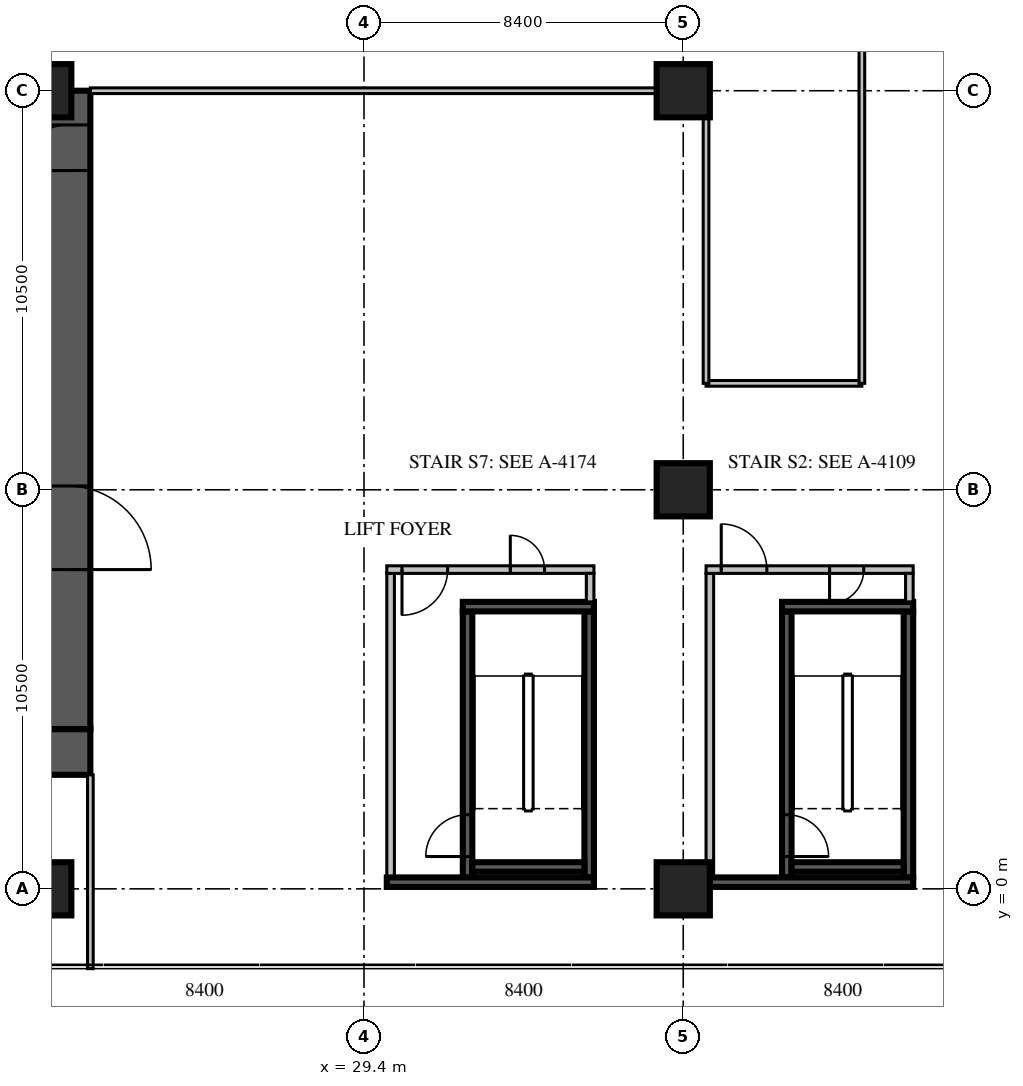
"""IFC4 building model, lengths in metres.
Left out: names, types, materials, properties, quantities, classifications, styles, units other than length and angle.
Written with IfcOpenShell. Run it as: python <this file> out.ifc"""

import sys

from ifc_helpers import new_model, si_unit, direction, frame, frame_2d, origin, origin_2d, place, context, subcontext, project, spatial, rectangle, extrude, source, transform, mapped, element, fill, save


model = new_model("IFC4")
c1 = context("Model", 3, precision=1e-05, world=origin(), true_north=direction((0.0, 1.0)))
c2 = subcontext(c1, "Body", "Model", "MODEL_VIEW")
j1 = project(units=[si_unit("LENGTHUNIT", "METRE"), si_unit("PLANEANGLEUNIT", "RADIAN")], contexts=[c1])
p1 = place(None, origin())
s1 = spatial("IfcSite", under=j1, at=p1, CompositionType="ELEMENT")
p2 = place(p1, origin())
s2 = spatial("IfcBuilding", under=s1, at=p2, CompositionType="ELEMENT")
p3 = place(p2, frame((0.0, 0.0, 23.7)))
s3 = spatial("IfcBuildingStorey", under=s2, at=p3, CompositionType="ELEMENT", Elevation=23.7)
m1 = source(origin(), c2, "Body", "SweptSolid", [
    extrude(rectangle(XDim=1.4, YDim=1.4, at=origin_2d()), origin(), (0.0, 0.0, 1.0), 5.4),
])
for number, where, z_axis, x_axis in (
    (1, (21.0, 0.0, 0.0), (0.0, 0.0, 1.0), (1.0, 0.0, 0.0)),
    (2, (21.0, 21.0, 0.0), (0.0, 0.0, 1.0), (1.0, 0.0, 0.0)),
    (3, (37.8, 0.0, 0.0), (0.0, 0.0, 1.0), (1.0, 0.0, 0.0)),
    (4, (37.8, 10.5, 0.0), (0.0, 0.0, 1.0), (1.0, 0.0, 0.0)),
    (5, (37.8, 21.0, 0.0), (0.0, 0.0, 1.0), (1.0, 0.0, 0.0)),
):
    element("IfcColumn", number, at=place(p3, frame(where, z_axis=z_axis, x_axis=x_axis)), inside=s3, PredefinedType="COLUMN", context=c2, shape_type="MappedRepresentation", body=[
        mapped(m1, transform((0.0, 0.0, 0.0), scale=1.0)),
    ])
m2 = source(origin(), c2, "Body", "SweptSolid", [
    extrude(rectangle(XDim=16.8, YDim=1.2, at=frame_2d((8.4, 0.0))), origin(), (0.0, 0.0, 1.0), 5.4),
])
p4 = place(p3, frame((21.6, 4.2, 0.0), z_axis=(0.0, 0.0, 1.0), x_axis=(0.0, 1.0, 0.0)))
e6 = element("IfcWall", 6, at=p4, inside=s3, PredefinedType="SHEAR", context=c2, shape_type="MappedRepresentation", body=[
    mapped(m2, transform((0.0, 0.0, 0.0), scale=1.0)),
])
m3 = source(origin(), c2, "Body", "SweptSolid", [
    extrude(rectangle(XDim=2.2, YDim=2.1, at=frame_2d((1.1, 1.05))), frame((0.0, 0.61, 0.0), z_axis=(0.0, -1.0, 0.0), x_axis=(1.0, 0.0, 0.0)), (0.0, 0.0, 1.0), 1.22),
])
p5 = place(p4, frame((4.2, 0.0, 0.0)))
e7 = element("IfcOpeningElement", 7, at=p5, cuts=e6, PredefinedType="OPENING", context=c2, shape_type="MappedRepresentation", body=[
    mapped(m3, transform((0.0, 0.0, 0.0), scale=1.0)),
])
m4 = source(origin(), c2, "Body", "SweptSolid", [
    extrude(rectangle(XDim=1.2, YDim=2.1, at=frame_2d((0.6, 1.05))), frame((0.0, 0.61, 0.0), z_axis=(0.0, -1.0, 0.0), x_axis=(1.0, 0.0, 0.0)), (0.0, 0.0, 1.0), 1.22),
])
p6 = place(p4, frame((14.7, 0.0, 0.0)))
e8 = element("IfcOpeningElement", 8, at=p6, cuts=e6, PredefinedType="OPENING", context=c2, shape_type="MappedRepresentation", body=[
    mapped(m4, transform((0.0, 0.0, 0.0), scale=1.0)),
])
m5 = source(origin(), c2, "Body", "SweptSolid", [
    extrude(rectangle(XDim=18.0, YDim=1.2, at=frame_2d((9.0, 0.0))), origin(), (0.0, 0.0, 1.0), 5.4),
])
p7 = place(p3, frame((4.2, 3.6, 0.0), z_axis=(0.0, 0.0, 1.0), x_axis=(1.0, 0.0, 0.0)))
e9 = element("IfcWall", 9, at=p7, inside=s3, PredefinedType="SHEAR", context=c2, shape_type="MappedRepresentation", body=[
    mapped(m5, transform((0.0, 0.0, 0.0), scale=1.0)),
])
m6 = source(origin(), c2, "Body", "SweptSolid", [
    extrude(rectangle(XDim=7.0, YDim=0.25, at=frame_2d((3.5, 0.0))), origin(), (0.0, 0.0, 1.0), 4.8),
])
p8 = place(p3, frame((40.525, 0.3, 0.0), z_axis=(0.0, 0.0, 1.0), x_axis=(0.0, 1.0, 0.0)))
e10 = element("IfcWall", 10, at=p8, inside=s3, PredefinedType="SOLIDWALL", context=c2, shape_type="MappedRepresentation", body=[
    mapped(m6, transform((0.0, 0.0, 0.0), scale=1.0)),
])
m7 = source(origin(), c2, "Body", "SweptSolid", [
    extrude(rectangle(XDim=1.1, YDim=2.1, at=frame_2d((0.55, 1.05))), frame((0.0, 0.135, 0.0), z_axis=(0.0, -1.0, 0.0), x_axis=(1.0, 0.0, 0.0)), (0.0, 0.0, 1.0), 0.27),
])
p9 = place(p8, frame((0.55, 0.0, 0.0)))
e11 = element("IfcOpeningElement", 11, at=p9, cuts=e10, PredefinedType="OPENING", context=c2, shape_type="MappedRepresentation", body=[
    mapped(m7, transform((0.0, 0.0, 0.0), scale=1.0)),
])
p10 = place(p3, frame((43.725, 0.3, 0.0), z_axis=(0.0, 0.0, 1.0), x_axis=(0.0, 1.0, 0.0)))
e12 = element("IfcWall", 12, at=p10, inside=s3, PredefinedType="SOLIDWALL", context=c2, shape_type="MappedRepresentation", body=[
    mapped(m6, transform((0.0, 0.0, 0.0), scale=1.0)),
])
m8 = source(origin(), c2, "Body", "SweptSolid", [
    extrude(rectangle(XDim=3.45, YDim=0.25, at=frame_2d((1.725, 0.0))), origin(), (0.0, 0.0, 1.0), 4.8),
])
p11 = place(p3, frame((40.4, 7.425, 0.0), z_axis=(0.0, 0.0, 1.0), x_axis=(1.0, 0.0, 0.0)))
e13 = element("IfcWall", 13, at=p11, inside=s3, PredefinedType="SOLIDWALL", context=c2, shape_type="MappedRepresentation", body=[
    mapped(m8, transform((0.0, 0.0, 0.0), scale=1.0)),
])
m9 = source(origin(), c2, "Body", "SweptSolid", [
    extrude(rectangle(XDim=2.95, YDim=0.25, at=frame_2d((1.475, 0.0))), origin(), (0.0, 0.0, 1.0), 4.8),
])
p12 = place(p3, frame((40.65, 0.575, 0.0), z_axis=(0.0, 0.0, 1.0), x_axis=(1.0, 0.0, 0.0)))
e14 = element("IfcWall", 14, at=p12, inside=s3, PredefinedType="SOLIDWALL", context=c2, shape_type="MappedRepresentation", body=[
    mapped(m9, transform((0.0, 0.0, 0.0), scale=1.0)),
])
m10 = source(origin(), c2, "Body", "SweptSolid", [
    extrude(rectangle(XDim=8.0, YDim=0.2, at=frame_2d((4.0, 0.0))), origin(), (0.0, 0.0, 1.0), 4.8),
])
p13 = place(p3, frame((38.5, 0.3, 0.0), z_axis=(0.0, 0.0, 1.0), x_axis=(0.0, 1.0, 0.0)))
e15 = element("IfcWall", 15, at=p13, inside=s3, PredefinedType="PARTITIONING", context=c2, shape_type="MappedRepresentation", body=[
    mapped(m10, transform((0.0, 0.0, 0.0), scale=1.0)),
])
m11 = source(origin(), c2, "Body", "SweptSolid", [
    extrude(rectangle(XDim=5.45, YDim=0.2, at=frame_2d((2.725, 0.0))), origin(), (0.0, 0.0, 1.0), 4.8),
])
p14 = place(p3, frame((38.4, 8.4, 0.0), z_axis=(0.0, 0.0, 1.0), x_axis=(1.0, 0.0, 0.0)))
e16 = element("IfcWall", 16, at=p14, inside=s3, PredefinedType="PARTITIONING", context=c2, shape_type="MappedRepresentation", body=[
    mapped(m11, transform((0.0, 0.0, 0.0), scale=1.0)),
])
m12 = source(origin(), c2, "Body", "SweptSolid", [
    extrude(rectangle(XDim=1.2, YDim=2.1, at=frame_2d((0.6, 1.05))), frame((0.0, 0.11, 0.0), z_axis=(0.0, -1.0, 0.0), x_axis=(1.0, 0.0, 0.0)), (0.0, 0.0, 1.0), 0.22),
])
p15 = place(p14, frame((0.4, 0.0, 0.0)))
e17 = element("IfcOpeningElement", 17, at=p15, cuts=e16, PredefinedType="OPENING", context=c2, shape_type="MappedRepresentation", body=[
    mapped(m12, transform((0.0, 0.0, 0.0), scale=1.0)),
])
m13 = source(origin(), c2, "Body", "SweptSolid", [
    extrude(rectangle(XDim=0.9, YDim=2.1, at=frame_2d((0.45, 1.05))), frame((0.0, 0.11, 0.0), z_axis=(0.0, -1.0, 0.0), x_axis=(1.0, 0.0, 0.0)), (0.0, 0.0, 1.0), 0.22),
])
p16 = place(p14, frame((3.25, 0.0, 0.0)))
e18 = element("IfcOpeningElement", 18, at=p16, cuts=e16, PredefinedType="OPENING", context=c2, shape_type="MappedRepresentation", body=[
    mapped(m13, transform((0.0, 0.0, 0.0), scale=1.0)),
])
m14 = source(origin(), c2, "Body", "SweptSolid", [
    extrude(rectangle(XDim=0.75, YDim=0.2, at=frame_2d((0.375, 0.0))), origin(), (0.0, 0.0, 1.0), 4.8),
])
p17 = place(p3, frame((43.75, 7.55, 0.0), z_axis=(0.0, 0.0, 1.0), x_axis=(0.0, 1.0, 0.0)))
e19 = element("IfcWall", 19, at=p17, inside=s3, PredefinedType="PARTITIONING", context=c2, shape_type="MappedRepresentation", body=[
    mapped(m14, transform((0.0, 0.0, 0.0), scale=1.0)),
])
m15 = source(origin(), c2, "Body", "SweptSolid", [
    extrude(rectangle(XDim=5.45, YDim=0.25, at=frame_2d((2.725, 0.0))), origin(), (0.0, 0.0, 1.0), 4.8),
])
p18 = place(p3, frame((38.4, 0.175, 0.0), z_axis=(0.0, 0.0, 1.0), x_axis=(1.0, 0.0, 0.0)))
e20 = element("IfcWall", 20, at=p18, inside=s3, PredefinedType="SOLIDWALL", context=c2, shape_type="MappedRepresentation", body=[
    mapped(m15, transform((0.0, 0.0, 0.0), scale=1.0)),
])
p19 = place(p3, frame((32.125, 0.3, 0.0), z_axis=(0.0, 0.0, 1.0), x_axis=(0.0, 1.0, 0.0)))
e21 = element("IfcWall", 21, at=p19, inside=s3, PredefinedType="SOLIDWALL", context=c2, shape_type="MappedRepresentation", body=[
    mapped(m6, transform((0.0, 0.0, 0.0), scale=1.0)),
])
p20 = place(p19, frame((0.55, 0.0, 0.0)))
e22 = element("IfcOpeningElement", 22, at=p20, cuts=e21, PredefinedType="OPENING", context=c2, shape_type="MappedRepresentation", body=[
    mapped(m7, transform((0.0, 0.0, 0.0), scale=1.0)),
])
p21 = place(p3, frame((35.325, 0.3, 0.0), z_axis=(0.0, 0.0, 1.0), x_axis=(0.0, 1.0, 0.0)))
e23 = element("IfcWall", 23, at=p21, inside=s3, PredefinedType="SOLIDWALL", context=c2, shape_type="MappedRepresentation", body=[
    mapped(m6, transform((0.0, 0.0, 0.0), scale=1.0)),
])
p22 = place(p3, frame((32.0, 7.425, 0.0), z_axis=(0.0, 0.0, 1.0), x_axis=(1.0, 0.0, 0.0)))
e24 = element("IfcWall", 24, at=p22, inside=s3, PredefinedType="SOLIDWALL", context=c2, shape_type="MappedRepresentation", body=[
    mapped(m8, transform((0.0, 0.0, 0.0), scale=1.0)),
])
p23 = place(p3, frame((32.25, 0.575, 0.0), z_axis=(0.0, 0.0, 1.0), x_axis=(1.0, 0.0, 0.0)))
e25 = element("IfcWall", 25, at=p23, inside=s3, PredefinedType="SOLIDWALL", context=c2, shape_type="MappedRepresentation", body=[
    mapped(m9, transform((0.0, 0.0, 0.0), scale=1.0)),
])
p24 = place(p3, frame((30.1, 0.3, 0.0), z_axis=(0.0, 0.0, 1.0), x_axis=(0.0, 1.0, 0.0)))
e26 = element("IfcWall", 26, at=p24, inside=s3, PredefinedType="PARTITIONING", context=c2, shape_type="MappedRepresentation", body=[
    mapped(m10, transform((0.0, 0.0, 0.0), scale=1.0)),
])
p25 = place(p3, frame((30.0, 8.4, 0.0), z_axis=(0.0, 0.0, 1.0), x_axis=(1.0, 0.0, 0.0)))
e27 = element("IfcWall", 27, at=p25, inside=s3, PredefinedType="PARTITIONING", context=c2, shape_type="MappedRepresentation", body=[
    mapped(m11, transform((0.0, 0.0, 0.0), scale=1.0)),
])
p26 = place(p25, frame((0.4, 0.0, 0.0)))
e28 = element("IfcOpeningElement", 28, at=p26, cuts=e27, PredefinedType="OPENING", context=c2, shape_type="MappedRepresentation", body=[
    mapped(m12, transform((0.0, 0.0, 0.0), scale=1.0)),
])
p27 = place(p25, frame((3.25, 0.0, 0.0)))
e29 = element("IfcOpeningElement", 29, at=p27, cuts=e27, PredefinedType="OPENING", context=c2, shape_type="MappedRepresentation", body=[
    mapped(m13, transform((0.0, 0.0, 0.0), scale=1.0)),
])
p28 = place(p3, frame((35.35, 7.55, 0.0), z_axis=(0.0, 0.0, 1.0), x_axis=(0.0, 1.0, 0.0)))
e30 = element("IfcWall", 30, at=p28, inside=s3, PredefinedType="PARTITIONING", context=c2, shape_type="MappedRepresentation", body=[
    mapped(m14, transform((0.0, 0.0, 0.0), scale=1.0)),
])
p29 = place(p3, frame((30.0, 0.175, 0.0), z_axis=(0.0, 0.0, 1.0), x_axis=(1.0, 0.0, 0.0)))
e31 = element("IfcWall", 31, at=p29, inside=s3, PredefinedType="SOLIDWALL", context=c2, shape_type="MappedRepresentation", body=[
    mapped(m15, transform((0.0, 0.0, 0.0), scale=1.0)),
])
m16 = source(origin(), c2, "Body", "SweptSolid", [
    extrude(rectangle(XDim=4.1, YDim=0.15, at=frame_2d((2.05, 0.0))), origin(), (0.0, 0.0, 1.0), 4.8),
])
p30 = place(p3, frame((38.4, 13.3, 0.0), z_axis=(0.0, 0.0, 1.0), x_axis=(1.0, 0.0, 0.0)))
e32 = element("IfcWall", 32, at=p30, inside=s3, PredefinedType="PARTITIONING", context=c2, shape_type="MappedRepresentation", body=[
    mapped(m16, transform((0.0, 0.0, 0.0), scale=1.0)),
])
m17 = source(origin(), c2, "Body", "SweptSolid", [
    extrude(rectangle(XDim=16.2, YDim=0.15, at=frame_2d((8.1, 0.0))), origin(), (0.0, 0.0, 1.0), 4.8),
])
p31 = place(p3, frame((22.2, 21.0, 0.0), z_axis=(0.0, 0.0, 1.0), x_axis=(1.0, 0.0, 0.0)))
e33 = element("IfcWall", 33, at=p31, inside=s3, PredefinedType="PARTITIONING", context=c2, shape_type="MappedRepresentation", body=[
    mapped(m17, transform((0.0, 0.0, 0.0), scale=1.0)),
])
m18 = source(origin(), c2, "Body", "SweptSolid", [
    extrude(rectangle(XDim=5.1, YDim=0.15, at=frame_2d((2.55, 0.0))), origin(), (0.0, 0.0, 1.0), 4.8),
])
p32 = place(p3, frame((22.2, -2.1, 0.0), z_axis=(0.0, 0.0, 1.0), x_axis=(0.0, 1.0, 0.0)))
e34 = element("IfcWall", 34, at=p32, inside=s3, PredefinedType="PARTITIONING", context=c2, shape_type="MappedRepresentation", body=[
    mapped(m18, transform((0.0, 0.0, 0.0), scale=1.0)),
])
m19 = source(origin(), c2, "Body", "SweptSolid", [
    extrude(rectangle(XDim=7.7, YDim=0.15, at=frame_2d((3.85, 0.0))), origin(), (0.0, 0.0, 1.0), 4.8),
])
p33 = place(p3, frame((38.4, 13.3, 0.0), z_axis=(0.0, 0.0, 1.0), x_axis=(0.0, 1.0, 0.0)))
e35 = element("IfcWall", 35, at=p33, inside=s3, PredefinedType="PARTITIONING", context=c2, shape_type="MappedRepresentation", body=[
    mapped(m19, transform((0.0, 0.0, 0.0), scale=1.0)),
])
m20 = source(origin(), c2, "Body", "SweptSolid", [
    extrude(rectangle(XDim=29.2, YDim=0.15, at=frame_2d((14.6, 0.0))), origin(), (0.0, 0.0, 1.0), 4.8),
])
p34 = place(p3, frame((42.5, 13.3, 0.0), z_axis=(0.0, 0.0, 1.0), x_axis=(0.0, 1.0, 0.0)))
e36 = element("IfcWall", 36, at=p34, inside=s3, PredefinedType="PARTITIONING", context=c2, shape_type="MappedRepresentation", body=[
    mapped(m20, transform((0.0, 0.0, 0.0), scale=1.0)),
])
m21 = source(origin(), c2, "Body", "SweptSolid", [
    extrude(rectangle(XDim=1.8, YDim=2.1, at=frame_2d((0.9, 1.05))), frame((0.0, 0.085, 0.0), z_axis=(0.0, -1.0, 0.0), x_axis=(1.0, 0.0, 0.0)), (0.0, 0.0, 1.0), 0.17),
])
p35 = place(p34, frame((13.7, 0.0, 0.0)))
e37 = element("IfcOpeningElement", 37, at=p35, cuts=e36, PredefinedType="OPENING", context=c2, shape_type="MappedRepresentation", body=[
    mapped(m21, transform((0.0, 0.0, 0.0), scale=1.0)),
])
m22 = source(origin(), c2, "Body", "SweptSolid", [
    extrude(rectangle(XDim=1.1, YDim=2.1, at=frame_2d((0.55, 1.05))), frame((0.0, 0.025, 0.0), z_axis=(0.0, -1.0, 0.0), x_axis=(1.0, 0.0, 0.0)), (0.0, 0.0, 1.0), 0.05),
])
p36 = place(p9, origin())
e38 = element("IfcDoor", 38, at=p36, inside=s3, OperationType="SINGLE_SWING_RIGHT", PredefinedType="DOOR", context=c2, shape_type="MappedRepresentation", body=[
    mapped(m22, transform((0.0, 0.0, 0.0), scale=1.0)),
])
fill(e11, e38)
m23 = source(origin(), c2, "Body", "SweptSolid", [
    extrude(rectangle(XDim=1.2, YDim=2.1, at=frame_2d((0.6, 1.05))), frame((0.0, 0.025, 0.0), z_axis=(0.0, -1.0, 0.0), x_axis=(1.0, 0.0, 0.0)), (0.0, 0.0, 1.0), 0.05),
])
p37 = place(p15, origin())
e39 = element("IfcDoor", 39, at=p37, inside=s3, OperationType="SINGLE_SWING_LEFT", PredefinedType="DOOR", context=c2, shape_type="MappedRepresentation", body=[
    mapped(m23, transform((0.0, 0.0, 0.0), scale=1.0)),
])
fill(e17, e39)
m24 = source(origin(), c2, "Body", "SweptSolid", [
    extrude(rectangle(XDim=0.9, YDim=2.1, at=frame_2d((0.45, 1.05))), frame((0.0, 0.025, 0.0), z_axis=(0.0, -1.0, 0.0), x_axis=(1.0, 0.0, 0.0)), (0.0, 0.0, 1.0), 0.05),
])
p38 = place(p16, origin())
e40 = element("IfcDoor", 40, at=p38, inside=s3, OperationType="SINGLE_SWING_RIGHT", PredefinedType="DOOR", context=c2, shape_type="MappedRepresentation", body=[
    mapped(m24, transform((0.0, 0.0, 0.0), scale=1.0)),
])
fill(e18, e40)
p39 = place(p20, origin())
e41 = element("IfcDoor", 41, at=p39, inside=s3, OperationType="SINGLE_SWING_LEFT", PredefinedType="DOOR", context=c2, shape_type="MappedRepresentation", body=[
    mapped(m22, transform((0.0, 0.0, 0.0), scale=1.0)),
])
fill(e22, e41)
p40 = place(p26, origin())
e42 = element("IfcDoor", 42, at=p40, inside=s3, OperationType="SINGLE_SWING_RIGHT", PredefinedType="DOOR", context=c2, shape_type="MappedRepresentation", body=[
    mapped(m23, transform((0.0, 0.0, 0.0), scale=1.0)),
])
fill(e28, e42)
p41 = place(p27, origin())
e43 = element("IfcDoor", 43, at=p41, inside=s3, OperationType="SINGLE_SWING_LEFT", PredefinedType="DOOR", context=c2, shape_type="MappedRepresentation", body=[
    mapped(m24, transform((0.0, 0.0, 0.0), scale=1.0)),
])
fill(e29, e43)
m25 = source(origin(), c2, "Body", "SweptSolid", [
    extrude(rectangle(XDim=2.2, YDim=2.1, at=frame_2d((1.1, 1.05))), frame((0.0, 0.025, 0.0), z_axis=(0.0, -1.0, 0.0), x_axis=(1.0, 0.0, 0.0)), (0.0, 0.0, 1.0), 0.05),
])
p42 = place(p5, origin())
e44 = element("IfcDoor", 44, at=p42, inside=s3, OperationType="DOUBLE_DOOR_SINGLE_SWING", PredefinedType="DOOR", context=c2, shape_type="MappedRepresentation", body=[
    mapped(m25, transform((0.0, 0.0, 0.0), scale=1.0)),
])
fill(e7, e44)
p43 = place(p6, origin())
e45 = element("IfcDoor", 45, at=p43, inside=s3, OperationType="SINGLE_SWING_LEFT", PredefinedType="DOOR", context=c2, shape_type="MappedRepresentation", body=[
    mapped(m23, transform((0.0, 0.0, 0.0), scale=1.0)),
])
fill(e8, e45)
save(model, sys.argv[1])
